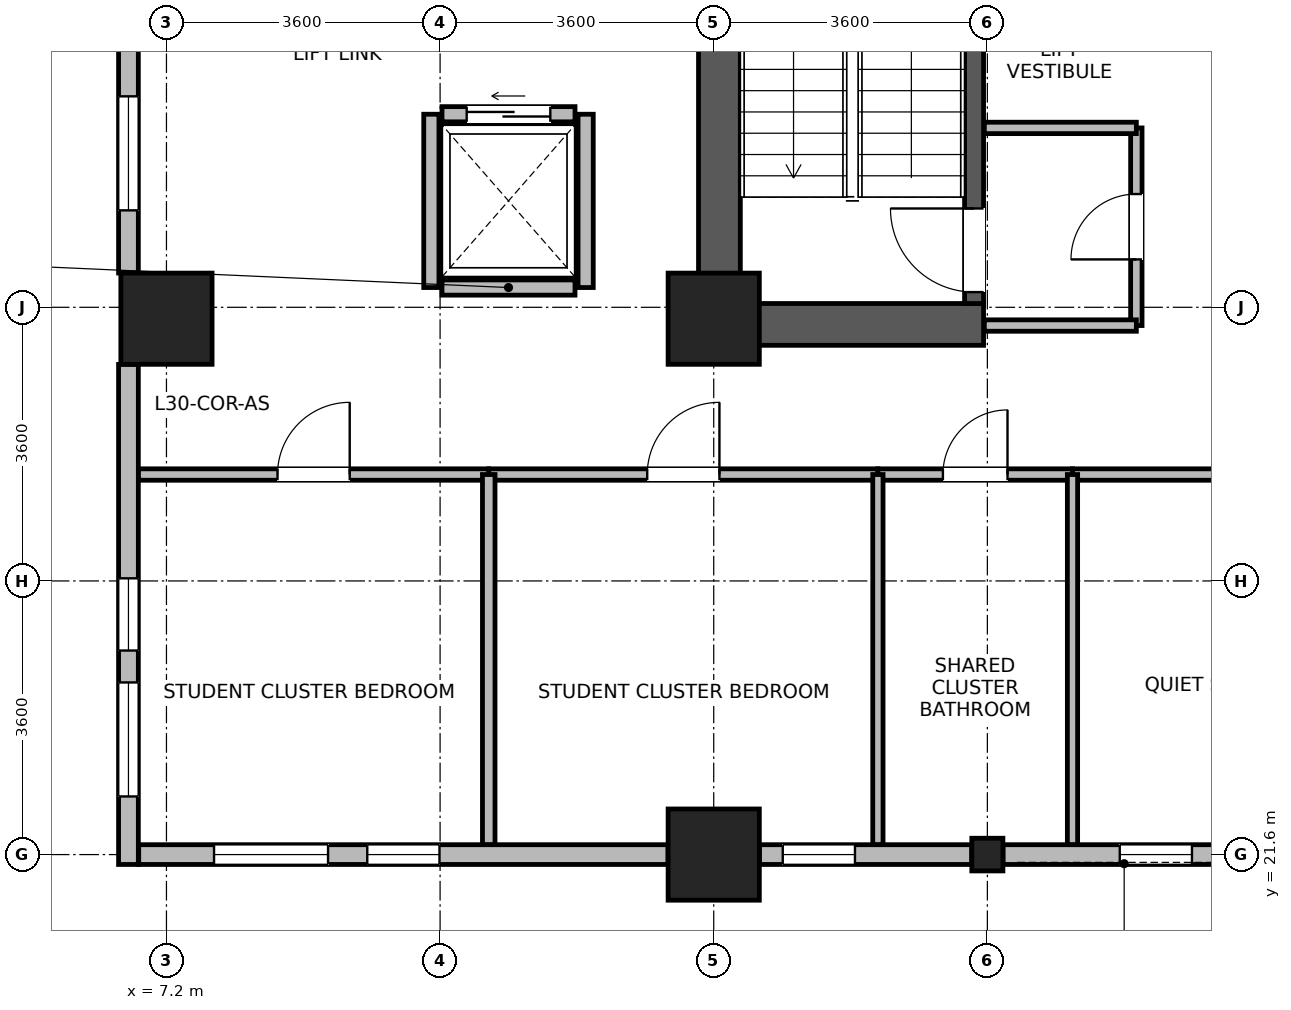
"""IFC4 building model, lengths in metres.
Left out: names, types, materials, properties, quantities, classifications, styles, units other than length and angle.
Written with IfcOpenShell. Run it as: python <this file> out.ifc"""

import sys

from ifc_helpers import new_model, si_unit, direction, frame, frame_2d, origin, origin_2d, place, context, subcontext, project, spatial, rectangle, i_section, extrude, source, transform, mapped, element, fill, save


model = new_model("IFC4")
c1 = context("Model", 3, precision=1e-05, world=origin(), true_north=direction((0.0, 1.0)))
c2 = subcontext(c1, "Body", "Model", "MODEL_VIEW")
j1 = project(units=[si_unit("LENGTHUNIT", "METRE"), si_unit("PLANEANGLEUNIT", "RADIAN")], contexts=[c1])
p1 = place(None, origin())
s1 = spatial("IfcSite", under=j1, at=p1, CompositionType="ELEMENT")
p2 = place(p1, origin())
s2 = spatial("IfcBuilding", under=s1, at=p2, CompositionType="ELEMENT")
p3 = place(p2, frame((0.0, 0.0, 119.3)))
s3 = spatial("IfcBuildingStorey", under=s2, at=p3, CompositionType="ELEMENT", Elevation=119.3)
p4 = place(p3, frame((14.475, 28.3, 0.0), z_axis=(0.0, 0.0, 1.0), x_axis=(0.0, 1.0, 0.0)))
e1 = element("IfcWall", 1, at=p4, inside=s3, PredefinedType="SHEAR", context=c2, shape_type="SweptSolid", body=[
    extrude(rectangle(XDim=8.1, YDim=0.55, at=frame_2d((4.05, 0.0))), origin(), (0.0, 0.0, 1.0), 3.45),
])
p5 = place(p3, frame((14.75, 28.575, 0.0), z_axis=(0.0, 0.0, 1.0), x_axis=(1.0, 0.0, 0.0)))
e2 = element("IfcWall", 2, at=p5, inside=s3, PredefinedType="SHEAR", context=c2, shape_type="SweptSolid", body=[
    extrude(rectangle(XDim=3.2, YDim=0.55, at=frame_2d((1.6, 0.0))), origin(), (0.0, 0.0, 1.0), 3.45),
])
p6 = place(p3, frame((17.825, 28.85, 0.0), z_axis=(0.0, 0.0, 1.0), x_axis=(0.0, 1.0, 0.0)))
e3 = element("IfcWall", 3, at=p6, inside=s3, PredefinedType="SHEAR", context=c2, shape_type="SweptSolid", body=[
    extrude(rectangle(XDim=7.0, YDim=0.25, at=frame_2d((3.5, 0.0))), origin(), (0.0, 0.0, 1.0), 3.45),
])
p7 = place(p6, frame((0.15, 0.0, 0.0)))
e4 = element("IfcOpeningElement", 4, at=p7, cuts=e3, PredefinedType="OPENING", context=c2, shape_type="SweptSolid", body=[
    extrude(rectangle(XDim=1.1, YDim=2.08, at=frame_2d((0.55, 1.04))), frame((0.0, 0.135, 0.0), z_axis=(0.0, -1.0, 0.0), x_axis=(1.0, 0.0, 0.0)), (0.0, 0.0, 1.0), 0.27),
])
m1 = source(origin(), c2, "Body", "SweptSolid", [
    extrude(rectangle(XDim=1.2, YDim=1.2, at=origin_2d()), origin(), (0.0, 0.0, 1.0), 3.7),
])
for number, where, z_axis, x_axis in (
    (5, (7.2, 28.65, 0.0), (0.0, 0.0, 1.0), (1.0, 0.0, 0.0)),
    (6, (14.4, 21.6, 0.0), (0.0, 0.0, 1.0), (1.0, 0.0, 0.0)),
    (7, (14.4, 28.65, 0.0), (0.0, 0.0, 1.0), (1.0, 0.0, 0.0)),
):
    element("IfcColumn", number, at=place(p3, frame(where, z_axis=z_axis, x_axis=x_axis)), inside=s3, PredefinedType="COLUMN", context=c2, shape_type="MappedRepresentation", body=[
        mapped(m1, transform((0.0, 0.0, 0.0), x_axis=(1.0, 0.0, 0.0), y_axis=(0.0, 1.0, 0.0), z_axis=(0.0, 0.0, 1.0), scale=1.0)),
    ])
m2 = source(origin(), c2, "Body", "SweptSolid", [
    extrude(i_section(OverallWidth=0.409, OverallDepth=0.43, WebThickness=0.024, FlangeThickness=0.033, FilletRadius=0.015, at=origin_2d()), origin(), (0.0, 0.0, 1.0), 3.7),
])
p8 = place(p3, frame((18.0, 21.6, 0.0), z_axis=(0.0, 0.0, 1.0), x_axis=(1.0, 0.0, 0.0)))
e8 = element("IfcColumn", 8, at=p8, inside=s3, PredefinedType="COLUMN", context=c2, shape_type="MappedRepresentation", body=[
    mapped(m2, transform((0.0, 0.0, 0.0), x_axis=(1.0, 0.0, 0.0), y_axis=(0.0, 1.0, 0.0), z_axis=(0.0, 0.0, 1.0), scale=1.0)),
])
p9 = place(p3, frame((6.7, 29.251, 0.0), z_axis=(0.0, 0.0, 1.0), x_axis=(0.0, 1.0, 0.0)))
e9 = element("IfcWall", 9, at=p9, inside=s3, PredefinedType="STANDARD", context=c2, shape_type="SweptSolid", body=[
    extrude(rectangle(XDim=6.298, YDim=0.26, at=frame_2d((3.149, 0.0))), origin(), (0.0, 0.0, 1.0), 3.43),
])
p10 = place(p9, frame((0.824, 0.0, 0.85)))
e10 = element("IfcOpeningElement", 10, at=p10, cuts=e9, PredefinedType="OPENING", context=c2, shape_type="SweptSolid", body=[
    extrude(rectangle(XDim=1.5, YDim=1.85, at=frame_2d((0.75, 0.925))), frame((0.0, 0.14, 0.0), z_axis=(0.0, -1.0, 0.0), x_axis=(1.0, 0.0, 0.0)), (0.0, 0.0, 1.0), 0.28),
])
p11 = place(p9, frame((3.973, 0.0, 0.85)))
e11 = element("IfcOpeningElement", 11, at=p11, cuts=e9, PredefinedType="OPENING", context=c2, shape_type="SweptSolid", body=[
    extrude(rectangle(XDim=1.5, YDim=1.85, at=frame_2d((0.75, 0.925))), frame((0.0, 0.14, 0.0), z_axis=(0.0, -1.0, 0.0), x_axis=(1.0, 0.0, 0.0)), (0.0, 0.0, 1.0), 0.28),
])
p12 = place(p3, frame((6.7, 21.47, 0.0), z_axis=(0.0, 0.0, 1.0), x_axis=(0.0, 1.0, 0.0)))
e12 = element("IfcWall", 12, at=p12, inside=s3, PredefinedType="STANDARD", context=c2, shape_type="SweptSolid", body=[
    extrude(rectangle(XDim=6.579, YDim=0.26, at=frame_2d((3.29, 0.0))), origin(), (0.0, 0.0, 1.0), 3.43),
])
p13 = place(p12, frame((0.895, 0.0, 0.85)))
e13 = element("IfcOpeningElement", 13, at=p13, cuts=e12, PredefinedType="OPENING", context=c2, shape_type="SweptSolid", body=[
    extrude(rectangle(XDim=1.5, YDim=1.85, at=frame_2d((0.75, 0.925))), frame((0.0, 0.14, 0.0), z_axis=(0.0, -1.0, 0.0), x_axis=(1.0, 0.0, 0.0)), (0.0, 0.0, 1.0), 0.28),
])
p14 = place(p12, frame((2.814, 0.0, 0.85)))
e14 = element("IfcOpeningElement", 14, at=p14, cuts=e12, PredefinedType="OPENING", context=c2, shape_type="SweptSolid", body=[
    extrude(rectangle(XDim=0.95, YDim=1.75, at=frame_2d((0.475, 0.875))), frame((0.0, 0.14, 0.0), z_axis=(0.0, -1.0, 0.0), x_axis=(1.0, 0.0, 0.0)), (0.0, 0.0, 1.0), 0.28),
])
p15 = place(p3, frame((13.799, 21.6, 0.0), z_axis=(0.0, 0.0, 1.0), x_axis=(-1.0, 0.0, 0.0)))
e15 = element("IfcWall", 15, at=p15, inside=s3, PredefinedType="STANDARD", context=c2, shape_type="SweptSolid", body=[
    extrude(rectangle(XDim=6.964, YDim=0.26, at=frame_2d((3.482, 0.0))), origin(), (0.0, 0.0, 1.0), 3.43),
])
p16 = place(p15, frame((4.473, 0.0, 0.85)))
e16 = element("IfcOpeningElement", 16, at=p16, cuts=e15, PredefinedType="OPENING", context=c2, shape_type="SweptSolid", body=[
    extrude(rectangle(XDim=1.5, YDim=1.85, at=frame_2d((0.75, 0.925))), frame((0.0, 0.14, 0.0), z_axis=(0.0, -1.0, 0.0), x_axis=(1.0, 0.0, 0.0)), (0.0, 0.0, 1.0), 0.28),
])
p17 = place(p15, frame((3.007, 0.0, 0.85)))
e17 = element("IfcOpeningElement", 17, at=p17, cuts=e15, PredefinedType="OPENING", context=c2, shape_type="SweptSolid", body=[
    extrude(rectangle(XDim=0.95, YDim=1.75, at=frame_2d((0.475, 0.875))), frame((0.0, 0.14, 0.0), z_axis=(0.0, -1.0, 0.0), x_axis=(1.0, 0.0, 0.0)), (0.0, 0.0, 1.0), 0.28),
])
p18 = place(p3, frame((17.794, 21.6, 0.0), z_axis=(0.0, 0.0, 1.0), x_axis=(-1.0, 0.0, 0.0)))
e18 = element("IfcWall", 18, at=p18, inside=s3, PredefinedType="STANDARD", context=c2, shape_type="SweptSolid", body=[
    extrude(rectangle(XDim=2.793, YDim=0.26, at=frame_2d((1.397, 0.0))), origin(), (0.0, 0.0, 1.0), 2.98),
])
p19 = place(p18, frame((1.536, 0.0, 0.85)))
e19 = element("IfcOpeningElement", 19, at=p19, cuts=e18, PredefinedType="OPENING", context=c2, shape_type="SweptSolid", body=[
    extrude(rectangle(XDim=0.95, YDim=1.75, at=frame_2d((0.475, 0.875))), frame((0.0, 0.14, 0.0), z_axis=(0.0, -1.0, 0.0), x_axis=(1.0, 0.0, 0.0)), (0.0, 0.0, 1.0), 0.28),
])
p20 = place(p3, frame((20.999, 21.6, 0.0), z_axis=(0.0, 0.0, 1.0), x_axis=(-1.0, 0.0, 0.0)))
e20 = element("IfcWall", 20, at=p20, inside=s3, PredefinedType="STANDARD", context=c2, shape_type="SweptSolid", body=[
    extrude(rectangle(XDim=2.793, YDim=0.26, at=frame_2d((1.397, 0.0))), origin(), (0.0, 0.0, 1.0), 2.98),
])
p21 = place(p20, frame((0.307, 0.0, 0.85)))
e21 = element("IfcOpeningElement", 21, at=p21, cuts=e20, PredefinedType="OPENING", context=c2, shape_type="SweptSolid", body=[
    extrude(rectangle(XDim=0.95, YDim=1.75, at=frame_2d((0.475, 0.875))), frame((0.0, 0.14, 0.0), z_axis=(0.0, -1.0, 0.0), x_axis=(1.0, 0.0, 0.0)), (0.0, 0.0, 1.0), 0.28),
])
p22 = place(p3, frame((10.825, 29.06, 0.0), z_axis=(0.0, 0.0, 1.0), x_axis=(1.0, 0.0, 0.0)))
e22 = element("IfcWall", 22, at=p22, inside=s3, PredefinedType="PARTITIONING", context=c2, shape_type="SweptSolid", body=[
    extrude(rectangle(XDim=1.75, YDim=0.2, at=frame_2d((0.875, 0.0))), origin(), (0.0, 0.0, 1.0), 3.43),
])
p23 = place(p3, frame((10.825, 31.34, 0.0), z_axis=(0.0, 0.0, 1.0), x_axis=(1.0, 0.0, 0.0)))
e23 = element("IfcWall", 23, at=p23, inside=s3, PredefinedType="PARTITIONING", context=c2, shape_type="SweptSolid", body=[
    extrude(rectangle(XDim=1.75, YDim=0.2, at=frame_2d((0.875, 0.0))), origin(), (0.0, 0.0, 1.0), 3.43),
])
p24 = place(p23, frame((0.325, 0.0, 0.0)))
e24 = element("IfcOpeningElement", 24, at=p24, cuts=e23, PredefinedType="OPENING", context=c2, shape_type="SweptSolid", body=[
    extrude(rectangle(XDim=1.1, YDim=2.12, at=frame_2d((0.55, 1.06))), frame((0.0, 0.11, 0.0), z_axis=(0.0, -1.0, 0.0), x_axis=(1.0, 0.0, 0.0)), (0.0, 0.0, 1.0), 0.22),
])
for number, where, z_axis, x_axis in (
    (25, (10.685, 29.06, 0.0), (0.0, 0.0, 1.0), (0.0, 1.0, 0.0)),
    (26, (12.715, 29.06, 0.0), (0.0, 0.0, 1.0), (0.0, 1.0, 0.0)),
):
    element("IfcWall", number, at=place(p3, frame(where, z_axis=z_axis, x_axis=x_axis)), inside=s3, PredefinedType="PARTITIONING", context=c2, shape_type="SweptSolid", body=[
        extrude(rectangle(XDim=2.28, YDim=0.2, at=frame_2d((1.14, 0.0))), origin(), (0.0, 0.0, 1.0), 3.43),
    ])
p25 = place(p3, frame((19.12, 26.6, 0.0), z_axis=(0.0, 0.0, 1.0), x_axis=(1.0, 0.0, 0.0)))
e27 = element("IfcWall", 27, at=p25, inside=s3, PredefinedType="PARTITIONING", context=c2, shape_type="SweptSolid", body=[
    extrude(rectangle(XDim=6.34, YDim=0.15, at=frame_2d((3.17, 0.0))), origin(), (0.0, 0.0, 1.0), 3.43),
])
p26 = place(p25, frame((2.52, 0.0, 0.0)))
e28 = element("IfcOpeningElement", 28, at=p26, cuts=e27, PredefinedType="OPENING", context=c2, shape_type="SweptSolid", body=[
    extrude(rectangle(XDim=1.3, YDim=2.12, at=frame_2d((0.65, 1.06))), frame((0.0, 0.085, 0.0), z_axis=(0.0, -1.0, 0.0), x_axis=(1.0, 0.0, 0.0)), (0.0, 0.0, 1.0), 0.17),
])
p27 = place(p3, frame((11.44, 26.6, 0.0), z_axis=(0.0, 0.0, 1.0), x_axis=(1.0, 0.0, 0.0)))
e29 = element("IfcWall", 29, at=p27, inside=s3, PredefinedType="PARTITIONING", context=c2, shape_type="SweptSolid", body=[
    extrude(rectangle(XDim=5.12, YDim=0.15, at=frame_2d((2.56, 0.0))), origin(), (0.0, 0.0, 1.0), 3.43),
])
p28 = place(p27, frame((2.085, 0.0, 0.0)))
e30 = element("IfcOpeningElement", 30, at=p28, cuts=e29, PredefinedType="OPENING", context=c2, shape_type="SweptSolid", body=[
    extrude(rectangle(XDim=0.95, YDim=2.1, at=frame_2d((0.475, 1.05))), frame((0.0, 0.085, 0.0), z_axis=(0.0, -1.0, 0.0), x_axis=(1.0, 0.0, 0.0)), (0.0, 0.0, 1.0), 0.17),
])
p29 = place(p3, frame((6.832, 26.6, 0.0), z_axis=(0.0, 0.0, 1.0), x_axis=(1.0, 0.0, 0.0)))
e31 = element("IfcWall", 31, at=p29, inside=s3, PredefinedType="PARTITIONING", context=c2, shape_type="SweptSolid", body=[
    extrude(rectangle(XDim=4.608, YDim=0.15, at=frame_2d((2.304, 0.0))), origin(), (0.0, 0.0, 1.0), 3.43),
])
p30 = place(p29, frame((1.829, 0.0, 0.0)))
e32 = element("IfcOpeningElement", 32, at=p30, cuts=e31, PredefinedType="OPENING", context=c2, shape_type="SweptSolid", body=[
    extrude(rectangle(XDim=0.95, YDim=2.1, at=frame_2d((0.475, 1.05))), frame((0.0, 0.085, 0.0), z_axis=(0.0, -1.0, 0.0), x_axis=(1.0, 0.0, 0.0)), (0.0, 0.0, 1.0), 0.17),
])
p31 = place(p3, frame((19.96, 28.56, 0.0), z_axis=(0.0, 0.0, 1.0), x_axis=(0.0, 1.0, 0.0)))
e33 = element("IfcWall", 33, at=p31, inside=s3, PredefinedType="PARTITIONING", context=c2, shape_type="SweptSolid", body=[
    extrude(rectangle(XDim=2.6, YDim=0.15, at=frame_2d((1.3, 0.0))), origin(), (0.0, 0.0, 1.0), 3.43),
])
p32 = place(p31, frame((0.87, 0.0, 0.0)))
e34 = element("IfcOpeningElement", 34, at=p32, cuts=e33, PredefinedType="OPENING", context=c2, shape_type="SweptSolid", body=[
    extrude(rectangle(XDim=0.86, YDim=2.02, at=frame_2d((0.43, 1.01))), frame((0.0, 0.085, 0.0), z_axis=(0.0, -1.0, 0.0), x_axis=(1.0, 0.0, 0.0)), (0.0, 0.0, 1.0), 0.17),
])
p33 = place(p3, frame((16.56, 26.6, 0.0), z_axis=(0.0, 0.0, 1.0), x_axis=(1.0, 0.0, 0.0)))
e35 = element("IfcWall", 35, at=p33, inside=s3, PredefinedType="PARTITIONING", context=c2, shape_type="SweptSolid", body=[
    extrude(rectangle(XDim=2.56, YDim=0.15, at=frame_2d((1.28, 0.0))), origin(), (0.0, 0.0, 1.0), 3.43),
])
p34 = place(p33, frame((0.855, 0.0, 0.0)))
e36 = element("IfcOpeningElement", 36, at=p34, cuts=e35, PredefinedType="OPENING", context=c2, shape_type="SweptSolid", body=[
    extrude(rectangle(XDim=0.85, YDim=2.04, at=frame_2d((0.425, 1.02))), frame((0.0, 0.085, 0.0), z_axis=(0.0, -1.0, 0.0), x_axis=(1.0, 0.0, 0.0)), (0.0, 0.0, 1.0), 0.17),
])
p35 = place(p3, frame((17.96, 28.56, 0.0), z_axis=(0.0, 0.0, 1.0), x_axis=(1.0, 0.0, 0.0)))
e37 = element("IfcWall", 37, at=p35, inside=s3, PredefinedType="PARTITIONING", context=c2, shape_type="SweptSolid", body=[
    extrude(rectangle(XDim=2.0, YDim=0.15, at=frame_2d((1.0, 0.0))), origin(), (0.0, 0.0, 1.0), 2.43),
])
p36 = place(p3, frame((17.96, 31.16, 0.0), z_axis=(0.0, 0.0, 1.0), x_axis=(1.0, 0.0, 0.0)))
e38 = element("IfcWall", 38, at=p36, inside=s3, PredefinedType="PARTITIONING", context=c2, shape_type="SweptSolid", body=[
    extrude(rectangle(XDim=2.0, YDim=0.15, at=frame_2d((1.0, 0.0))), origin(), (0.0, 0.0, 1.0), 3.43),
])
p37 = place(p3, frame((11.44, 21.732, 0.0), z_axis=(0.0, 0.0, 1.0), x_axis=(0.0, 1.0, 0.0)))
e39 = element("IfcWall", 39, at=p37, inside=s3, PredefinedType="PARTITIONING", context=c2, shape_type="SweptSolid", body=[
    extrude(rectangle(XDim=4.868, YDim=0.165, at=frame_2d((2.434, 0.0))), origin(), (0.0, 0.0, 1.0), 3.43),
])
for number, where, z_axis, x_axis in (
    (40, (16.56, 21.732, 0.0), (0.0, 0.0, 1.0), (0.0, 1.0, 0.0)),
    (41, (19.12, 21.732, 0.0), (0.0, 0.0, 1.0), (0.0, 1.0, 0.0)),
):
    element("IfcWall", number, at=place(p3, frame(where, z_axis=z_axis, x_axis=x_axis)), inside=s3, PredefinedType="PARTITIONING", context=c2, shape_type="SweptSolid", body=[
        extrude(rectangle(XDim=4.868, YDim=0.135, at=frame_2d((2.434, 0.0))), origin(), (0.0, 0.0, 1.0), 3.43),
    ])
p38 = place(p10, origin())
e42 = element("IfcWindow", 42, at=p38, inside=s3, PartitioningType="SINGLE_PANEL", PredefinedType="WINDOW", context=c2, shape_type="SweptSolid", body=[
    extrude(rectangle(XDim=1.5, YDim=1.85, at=frame_2d((0.75, 0.925))), frame((0.0, 0.03, 0.0), z_axis=(0.0, -1.0, 0.0), x_axis=(1.0, 0.0, 0.0)), (0.0, 0.0, 1.0), 0.06),
])
fill(e10, e42)
p39 = place(p13, origin())
e43 = element("IfcWindow", 43, at=p39, inside=s3, PartitioningType="SINGLE_PANEL", PredefinedType="WINDOW", context=c2, shape_type="SweptSolid", body=[
    extrude(rectangle(XDim=1.5, YDim=1.85, at=frame_2d((0.75, 0.925))), frame((0.0, 0.03, 0.0), z_axis=(0.0, -1.0, 0.0), x_axis=(1.0, 0.0, 0.0)), (0.0, 0.0, 1.0), 0.06),
])
fill(e13, e43)
p40 = place(p14, origin())
e44 = element("IfcWindow", 44, at=p40, inside=s3, PartitioningType="SINGLE_PANEL", PredefinedType="WINDOW", context=c2, shape_type="SweptSolid", body=[
    extrude(rectangle(XDim=0.95, YDim=1.75, at=frame_2d((0.475, 0.875))), frame((0.0, 0.03, 0.0), z_axis=(0.0, -1.0, 0.0), x_axis=(1.0, 0.0, 0.0)), (0.0, 0.0, 1.0), 0.06),
])
fill(e14, e44)
p41 = place(p16, origin())
e45 = element("IfcWindow", 45, at=p41, inside=s3, PartitioningType="SINGLE_PANEL", PredefinedType="WINDOW", context=c2, shape_type="SweptSolid", body=[
    extrude(rectangle(XDim=1.5, YDim=1.85, at=frame_2d((0.75, 0.925))), frame((0.0, 0.03, 0.0), z_axis=(0.0, -1.0, 0.0), x_axis=(1.0, 0.0, 0.0)), (0.0, 0.0, 1.0), 0.06),
])
fill(e16, e45)
p42 = place(p17, origin())
e46 = element("IfcWindow", 46, at=p42, inside=s3, PartitioningType="SINGLE_PANEL", PredefinedType="WINDOW", context=c2, shape_type="SweptSolid", body=[
    extrude(rectangle(XDim=0.95, YDim=1.75, at=frame_2d((0.475, 0.875))), frame((0.0, 0.03, 0.0), z_axis=(0.0, -1.0, 0.0), x_axis=(1.0, 0.0, 0.0)), (0.0, 0.0, 1.0), 0.06),
])
fill(e17, e46)
p43 = place(p19, origin())
e47 = element("IfcWindow", 47, at=p43, inside=s3, PartitioningType="SINGLE_PANEL", PredefinedType="WINDOW", context=c2, shape_type="SweptSolid", body=[
    extrude(rectangle(XDim=0.95, YDim=1.75, at=frame_2d((0.475, 0.875))), frame((0.0, 0.03, 0.0), z_axis=(0.0, -1.0, 0.0), x_axis=(1.0, 0.0, 0.0)), (0.0, 0.0, 1.0), 0.06),
])
fill(e19, e47)
p44 = place(p21, origin())
e48 = element("IfcWindow", 48, at=p44, inside=s3, PartitioningType="SINGLE_PANEL", PredefinedType="WINDOW", context=c2, shape_type="SweptSolid", body=[
    extrude(rectangle(XDim=0.95, YDim=1.75, at=frame_2d((0.475, 0.875))), frame((0.0, 0.03, 0.0), z_axis=(0.0, -1.0, 0.0), x_axis=(1.0, 0.0, 0.0)), (0.0, 0.0, 1.0), 0.06),
])
fill(e21, e48)
p45 = place(p7, origin())
e49 = element("IfcDoor", 49, at=p45, inside=s3, OperationType="SINGLE_SWING_RIGHT", PredefinedType="DOOR", context=c2, shape_type="SweptSolid", body=[
    extrude(rectangle(XDim=1.1, YDim=2.08, at=frame_2d((0.55, 1.04))), frame((0.0, 0.025, 0.0), z_axis=(0.0, -1.0, 0.0), x_axis=(1.0, 0.0, 0.0)), (0.0, 0.0, 1.0), 0.05),
])
fill(e4, e49)
p46 = place(p24, origin())
e50 = element("IfcDoor", 50, at=p46, inside=s3, OperationType="SLIDING_TO_LEFT", PredefinedType="DOOR", context=c2, shape_type="SweptSolid", body=[
    extrude(rectangle(XDim=1.1, YDim=2.12, at=frame_2d((0.55, 1.06))), frame((0.0, 0.025, 0.0), z_axis=(0.0, -1.0, 0.0), x_axis=(1.0, 0.0, 0.0)), (0.0, 0.0, 1.0), 0.05),
])
fill(e24, e50)
p47 = place(p28, origin())
e51 = element("IfcDoor", 51, at=p47, inside=s3, OperationType="SINGLE_SWING_RIGHT", PredefinedType="DOOR", context=c2, shape_type="SweptSolid", body=[
    extrude(rectangle(XDim=0.95, YDim=2.1, at=frame_2d((0.475, 1.05))), frame((0.0, 0.025, 0.0), z_axis=(0.0, -1.0, 0.0), x_axis=(1.0, 0.0, 0.0)), (0.0, 0.0, 1.0), 0.05),
])
fill(e30, e51)
p48 = place(p30, origin())
e52 = element("IfcDoor", 52, at=p48, inside=s3, OperationType="SINGLE_SWING_RIGHT", PredefinedType="DOOR", context=c2, shape_type="SweptSolid", body=[
    extrude(rectangle(XDim=0.95, YDim=2.1, at=frame_2d((0.475, 1.05))), frame((0.0, 0.025, 0.0), z_axis=(0.0, -1.0, 0.0), x_axis=(1.0, 0.0, 0.0)), (0.0, 0.0, 1.0), 0.05),
])
fill(e32, e52)
p49 = place(p32, origin())
e53 = element("IfcDoor", 53, at=p49, inside=s3, OperationType="SINGLE_SWING_LEFT", PredefinedType="DOOR", context=c2, shape_type="SweptSolid", body=[
    extrude(rectangle(XDim=0.86, YDim=2.02, at=frame_2d((0.43, 1.01))), frame((0.0, 0.025, 0.0), z_axis=(0.0, -1.0, 0.0), x_axis=(1.0, 0.0, 0.0)), (0.0, 0.0, 1.0), 0.05),
])
fill(e34, e53)
p50 = place(p34, origin())
e54 = element("IfcDoor", 54, at=p50, inside=s3, OperationType="SINGLE_SWING_RIGHT", PredefinedType="DOOR", context=c2, shape_type="SweptSolid", body=[
    extrude(rectangle(XDim=0.85, YDim=2.04, at=frame_2d((0.425, 1.02))), frame((0.0, 0.025, 0.0), z_axis=(0.0, -1.0, 0.0), x_axis=(1.0, 0.0, 0.0)), (0.0, 0.0, 1.0), 0.05),
])
fill(e36, e54)
save(model, sys.argv[1])
